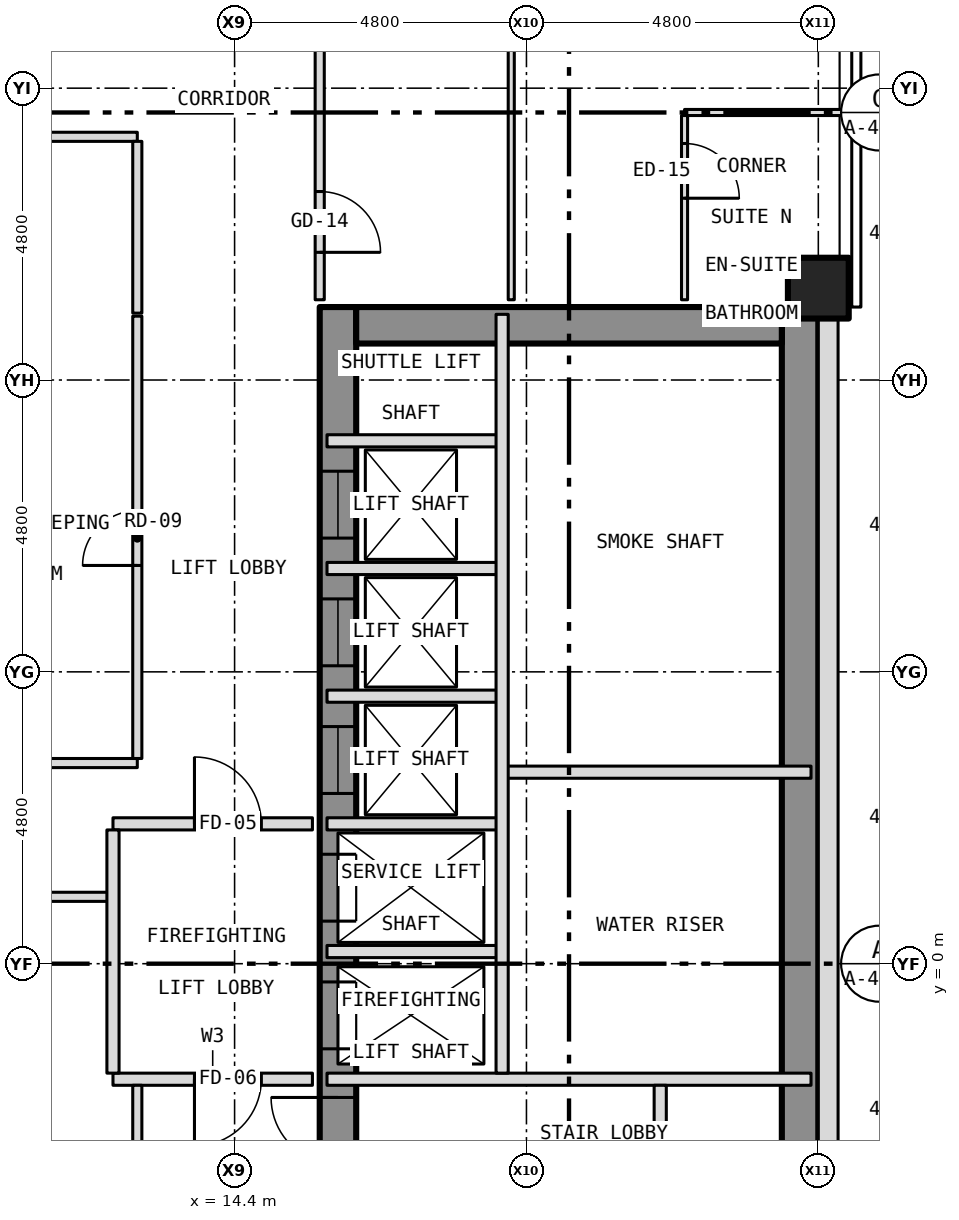
"""IFC4 building model, lengths in metres.
Left out: names, types, materials, properties, quantities, classifications, styles, units other than length and angle.
Written with IfcOpenShell. Run it as: python <this file> out.ifc"""

import sys

from ifc_helpers import new_model, si_unit, direction, frame, frame_2d, origin, origin_2d, place, context, subcontext, project, spatial, rectangle, hollow_rectangle, extrude, element, fill, save


model = new_model("IFC4")
c1 = context("Model", 3, precision=1e-05, world=origin(), true_north=direction((0.0, 1.0)))
c2 = subcontext(c1, "Body", "Model", "MODEL_VIEW")
j1 = project(units=[si_unit("LENGTHUNIT", "METRE"), si_unit("PLANEANGLEUNIT", "RADIAN")], contexts=[c1])
p1 = place(None, origin())
s1 = spatial("IfcSite", under=j1, at=p1, CompositionType="ELEMENT")
p2 = place(p1, origin())
s2 = spatial("IfcBuilding", under=s1, at=p2, CompositionType="ELEMENT")
p3 = place(p2, frame((0.0, 0.0, 39.0)))
s3 = spatial("IfcBuildingStorey", under=s2, at=p3, CompositionType="ELEMENT", Elevation=39.0)
p4 = place(p3, frame((24.0, 11.111, -0.15), z_axis=(0.0, 0.0, 1.0), x_axis=(1.0, 0.0, 0.0)))
e1 = element("IfcColumn", 1, at=p4, inside=s3, PredefinedType="COLUMN", context=c2, shape_type="SweptSolid", body=[
    extrude(hollow_rectangle(XDim=1.0, YDim=1.0, WallThickness=0.06, at=origin_2d()), origin(), (0.0, 0.0, 1.0), 3.5),
])
p5 = place(p3, frame((16.1, -10.8, 0.0), z_axis=(0.0, 0.0, 1.0), x_axis=(0.0, 1.0, 0.0)))
e2 = element("IfcWall", 2, at=p5, inside=s3, PredefinedType="SHEAR", context=c2, shape_type="SweptSolid", body=[
    extrude(rectangle(XDim=21.6, YDim=0.6, at=frame_2d((10.8, 0.0))), origin(), (0.0, 0.0, 1.0), 3.25),
])
p6 = place(p5, frame((9.4, 0.0, 0.0)))
e3 = element("IfcOpeningElement", 3, at=p6, cuts=e2, PredefinedType="OPENING", context=c2, shape_type="SweptSolid", body=[
    extrude(rectangle(XDim=1.1, YDim=2.1, at=frame_2d((0.55, 1.05))), frame((0.0, 0.312, 0.0), z_axis=(0.0, -1.0, 0.0), x_axis=(1.0, 0.0, 0.0)), (0.0, 0.0, 1.0), 0.624),
])
p7 = place(p5, frame((11.5, 0.0, 0.0)))
e4 = element("IfcOpeningElement", 4, at=p7, cuts=e2, PredefinedType="OPENING", context=c2, shape_type="SweptSolid", body=[
    extrude(rectangle(XDim=1.1, YDim=2.1, at=frame_2d((0.55, 1.05))), frame((0.0, 0.312, 0.0), z_axis=(0.0, -1.0, 0.0), x_axis=(1.0, 0.0, 0.0)), (0.0, 0.0, 1.0), 0.624),
])
p8 = place(p5, frame((13.6, 0.0, 0.0)))
e5 = element("IfcOpeningElement", 5, at=p8, cuts=e2, PredefinedType="OPENING", context=c2, shape_type="SweptSolid", body=[
    extrude(rectangle(XDim=1.1, YDim=2.1, at=frame_2d((0.55, 1.05))), frame((0.0, 0.312, 0.0), z_axis=(0.0, -1.0, 0.0), x_axis=(1.0, 0.0, 0.0)), (0.0, 0.0, 1.0), 0.624),
])
p9 = place(p5, frame((15.7, 0.0, 0.0)))
e6 = element("IfcOpeningElement", 6, at=p9, cuts=e2, PredefinedType="OPENING", context=c2, shape_type="SweptSolid", body=[
    extrude(rectangle(XDim=1.1, YDim=2.1, at=frame_2d((0.55, 1.05))), frame((0.0, 0.312, 0.0), z_axis=(0.0, -1.0, 0.0), x_axis=(1.0, 0.0, 0.0)), (0.0, 0.0, 1.0), 0.624),
])
p10 = place(p5, frame((17.8, 0.0, 0.0)))
e7 = element("IfcOpeningElement", 7, at=p10, cuts=e2, PredefinedType="OPENING", context=c2, shape_type="SweptSolid", body=[
    extrude(rectangle(XDim=1.1, YDim=2.1, at=frame_2d((0.55, 1.05))), frame((0.0, 0.312, 0.0), z_axis=(0.0, -1.0, 0.0), x_axis=(1.0, 0.0, 0.0)), (0.0, 0.0, 1.0), 0.624),
])
p11 = place(p5, frame((5.642, 0.0, 0.0)))
e8 = element("IfcOpeningElement", 8, at=p11, cuts=e2, PredefinedType="OPENING", context=c2, shape_type="SweptSolid", body=[
    extrude(rectangle(XDim=1.1, YDim=2.1, at=frame_2d((0.55, 1.05))), frame((0.0, 0.312, 0.0), z_axis=(0.0, -1.0, 0.0), x_axis=(1.0, 0.0, 0.0)), (0.0, 0.0, 1.0), 0.624),
])
p12 = place(p5, frame((7.5, 0.0, 0.0)))
e9 = element("IfcOpeningElement", 9, at=p12, cuts=e2, PredefinedType="OPENING", context=c2, shape_type="SweptSolid", body=[
    extrude(rectangle(XDim=1.1, YDim=2.1, at=frame_2d((0.55, 1.05))), frame((0.0, 0.312, 0.0), z_axis=(0.0, -1.0, 0.0), x_axis=(1.0, 0.0, 0.0)), (0.0, 0.0, 1.0), 0.624),
])
p13 = place(p3, frame((23.7, -10.8, 0.0), z_axis=(0.0, 0.0, 1.0), x_axis=(0.0, 1.0, 0.0)))
e10 = element("IfcWall", 10, at=p13, inside=s3, PredefinedType="SHEAR", context=c2, shape_type="SweptSolid", body=[
    extrude(rectangle(XDim=21.6, YDim=0.6, at=frame_2d((10.8, 0.0))), origin(), (0.0, 0.0, 1.0), 3.25),
])
p14 = place(p3, frame((16.4, 10.5, 0.0), z_axis=(0.0, 0.0, 1.0), x_axis=(1.0, 0.0, 0.0)))
e11 = element("IfcWall", 11, at=p14, inside=s3, PredefinedType="SHEAR", context=c2, shape_type="SweptSolid", body=[
    extrude(rectangle(XDim=7.0, YDim=0.6, at=frame_2d((3.5, 0.0))), origin(), (0.0, 0.0, 1.0), 3.25),
])
p15 = place(p3, frame((24.163, -10.8, 0.0), z_axis=(0.0, 0.0, 1.0), x_axis=(0.0, 1.0, 0.0)))
e12 = element("IfcWall", 12, at=p15, inside=s3, PredefinedType="SOLIDWALL", context=c2, shape_type="SweptSolid", body=[
    extrude(rectangle(XDim=21.6, YDim=0.325, at=frame_2d((10.8, 0.0))), origin(), (0.0, 0.0, 1.0), 3.5),
])
p16 = place(p15, frame((2.95, 0.0, 1.0)))
e13 = element("IfcOpeningElement", 13, at=p16, cuts=e12, PredefinedType="OPENING", context=c2, shape_type="SweptSolid", body=[
    extrude(rectangle(XDim=0.6, YDim=1.5, at=frame_2d((0.3, 0.75))), frame((0.0, 0.175, 0.0), z_axis=(0.0, -1.0, 0.0), x_axis=(1.0, 0.0, 0.0)), (0.0, 0.0, 1.0), 0.349),
])
p17 = place(p3, frame((12.4, -1.9, 0.0), z_axis=(0.0, 0.0, 1.0), x_axis=(1.0, 0.0, 0.0)))
e14 = element("IfcWall", 14, at=p17, inside=s3, PredefinedType="PARTITIONING", context=c2, shape_type="SweptSolid", body=[
    extrude(rectangle(XDim=3.28, YDim=0.2, at=frame_2d((1.64, 0.0))), origin(), (0.0, 0.0, 1.0), 3.35),
])
p18 = place(p17, frame((1.34, 0.0, 0.0)))
e15 = element("IfcOpeningElement", 15, at=p18, cuts=e14, PredefinedType="OPENING", context=c2, shape_type="SweptSolid", body=[
    extrude(rectangle(XDim=1.1, YDim=2.1, at=frame_2d((0.55, 1.05))), frame((0.0, 0.112, 0.0), z_axis=(0.0, -1.0, 0.0), x_axis=(1.0, 0.0, 0.0)), (0.0, 0.0, 1.0), 0.224),
])
p19 = place(p3, frame((15.92, -1.9, 0.0), z_axis=(0.0, 0.0, 1.0), x_axis=(1.0, 0.0, 0.0)))
e16 = element("IfcWall", 16, at=p19, inside=s3, PredefinedType="PARTITIONING", context=c2, shape_type="SweptSolid", body=[
    extrude(rectangle(XDim=7.96, YDim=0.2, at=frame_2d((3.98, 0.0))), origin(), (0.0, 0.0, 1.0), 3.25),
])
p20 = place(p3, frame((15.92, 0.2, 0.0), z_axis=(0.0, 0.0, 1.0), x_axis=(1.0, 0.0, 0.0)))
e17 = element("IfcWall", 17, at=p20, inside=s3, PredefinedType="PARTITIONING", context=c2, shape_type="SweptSolid", body=[
    extrude(rectangle(XDim=2.88, YDim=0.2, at=frame_2d((1.44, 0.0))), origin(), (0.0, 0.0, 1.0), 3.25),
])
p21 = place(p3, frame((-12.4, 1.1, 0.0), z_axis=(0.0, 0.0, 1.0), x_axis=(1.0, 0.0, 0.0)))
e18 = element("IfcWall", 18, at=p21, inside=s3, PredefinedType="PARTITIONING", context=c2, shape_type="SweptSolid", body=[
    extrude(rectangle(XDim=24.8, YDim=0.15, at=frame_2d((12.4, 0.0))), origin(), (0.0, 0.0, 1.0), 3.35),
])
p22 = place(p3, frame((12.4, 2.3, 0.0), z_axis=(0.0, 0.0, 1.0), x_axis=(1.0, 0.0, 0.0)))
e19 = element("IfcWall", 19, at=p22, inside=s3, PredefinedType="PARTITIONING", context=c2, shape_type="SweptSolid", body=[
    extrude(rectangle(XDim=3.28, YDim=0.2, at=frame_2d((1.64, 0.0))), origin(), (0.0, 0.0, 1.0), 3.35),
])
p23 = place(p22, frame((1.34, 0.0, 0.0)))
e20 = element("IfcOpeningElement", 20, at=p23, cuts=e19, PredefinedType="OPENING", context=c2, shape_type="SweptSolid", body=[
    extrude(rectangle(XDim=1.1, YDim=2.1, at=frame_2d((0.55, 1.05))), frame((0.0, 0.112, 0.0), z_axis=(0.0, -1.0, 0.0), x_axis=(1.0, 0.0, 0.0)), (0.0, 0.0, 1.0), 0.224),
])
p24 = place(p3, frame((15.92, 2.3, 0.0), z_axis=(0.0, 0.0, 1.0), x_axis=(1.0, 0.0, 0.0)))
e21 = element("IfcWall", 21, at=p24, inside=s3, PredefinedType="PARTITIONING", context=c2, shape_type="SweptSolid", body=[
    extrude(rectangle(XDim=2.88, YDim=0.2, at=frame_2d((1.44, 0.0))), origin(), (0.0, 0.0, 1.0), 3.25),
])
p25 = place(p3, frame((18.8, 3.15, 0.0), z_axis=(0.0, 0.0, 1.0), x_axis=(1.0, 0.0, 0.0)))
e22 = element("IfcWall", 22, at=p25, inside=s3, PredefinedType="PARTITIONING", context=c2, shape_type="SweptSolid", body=[
    extrude(rectangle(XDim=5.08, YDim=0.2, at=frame_2d((2.54, 0.0))), origin(), (0.0, 0.0, 1.0), 3.25),
])
p26 = place(p3, frame((-12.8, 3.3, 0.0), z_axis=(0.0, 0.0, 1.0), x_axis=(1.0, 0.0, 0.0)))
e23 = element("IfcWall", 23, at=p26, inside=s3, PredefinedType="PARTITIONING", context=c2, shape_type="SweptSolid", body=[
    extrude(rectangle(XDim=25.6, YDim=0.15, at=frame_2d((12.8, 0.0))), origin(), (0.0, 0.0, 1.0), 3.35),
])
p27 = place(p26, frame((1.95, 0.0, 0.0)))
e24 = element("IfcOpeningElement", 24, at=p27, cuts=e23, PredefinedType="OPENING", context=c2, shape_type="SweptSolid", body=[
    extrude(rectangle(XDim=0.9, YDim=2.1, at=frame_2d((0.45, 1.05))), frame((0.0, 0.087, 0.0), z_axis=(0.0, -1.0, 0.0), x_axis=(1.0, 0.0, 0.0)), (0.0, 0.0, 1.0), 0.174),
])
for number, where, z_axis, x_axis in (
    (25, (15.92, 4.4, 0.0), (0.0, 0.0, 1.0), (1.0, 0.0, 0.0)),
    (26, (15.92, 6.5, 0.0), (0.0, 0.0, 1.0), (1.0, 0.0, 0.0)),
    (27, (15.92, 8.6, 0.0), (0.0, 0.0, 1.0), (1.0, 0.0, 0.0)),
):
    element("IfcWall", number, at=place(p3, frame(where, z_axis=z_axis, x_axis=x_axis)), inside=s3, PredefinedType="PARTITIONING", context=c2, shape_type="SweptSolid", body=[
        extrude(rectangle(XDim=2.88, YDim=0.2, at=frame_2d((1.44, 0.0))), origin(), (0.0, 0.0, 1.0), 3.25),
    ])
p28 = place(p3, frame((-12.8, 13.6, 0.0), z_axis=(0.0, 0.0, 1.0), x_axis=(1.0, 0.0, 0.0)))
e28 = element("IfcWall", 28, at=p28, inside=s3, PredefinedType="PARTITIONING", context=c2, shape_type="SweptSolid", body=[
    extrude(rectangle(XDim=25.6, YDim=0.15, at=frame_2d((12.8, 0.0))), origin(), (0.0, 0.0, 1.0), 3.35),
])
p29 = place(p28, frame((12.35, 0.0, 0.0)))
e29 = element("IfcOpeningElement", 29, at=p29, cuts=e28, PredefinedType="OPENING", context=c2, shape_type="SweptSolid", body=[
    extrude(rectangle(XDim=0.9, YDim=2.1, at=frame_2d((0.45, 1.05))), frame((0.0, 0.087, 0.0), z_axis=(0.0, -1.0, 0.0), x_axis=(1.0, 0.0, 0.0)), (0.0, 0.0, 1.0), 0.174),
])
p30 = place(p3, frame((21.8, 14.0, 0.0), z_axis=(0.0, 0.0, 1.0), x_axis=(1.0, 0.0, 0.0)))
e30 = element("IfcWall", 30, at=p30, inside=s3, PredefinedType="PARTITIONING", context=c2, shape_type="SweptSolid", body=[
    extrude(rectangle(XDim=2.78, YDim=0.1, at=frame_2d((1.39, 0.0))), origin(), (0.0, 0.0, 1.0), 3.35),
])
p31 = place(p3, frame((12.4, -1.8, 0.0), z_axis=(0.0, 0.0, 1.0), x_axis=(0.0, 1.0, 0.0)))
e31 = element("IfcWall", 31, at=p31, inside=s3, PredefinedType="PARTITIONING", context=c2, shape_type="SweptSolid", body=[
    extrude(rectangle(XDim=4.0, YDim=0.2, at=frame_2d((2.0, 0.0))), origin(), (0.0, 0.0, 1.0), 3.35),
])
p32 = place(p3, frame((12.8, -13.525, 0.0), z_axis=(0.0, 0.0, 1.0), x_axis=(0.0, 1.0, 0.0)))
e32 = element("IfcWall", 32, at=p32, inside=s3, PredefinedType="PARTITIONING", context=c2, shape_type="SweptSolid", body=[
    extrude(rectangle(XDim=11.525, YDim=0.15, at=frame_2d((5.762, 0.0))), origin(), (0.0, 0.0, 1.0), 3.35),
])
p33 = place(p32, frame((6.725, 0.0, 0.0)))
e33 = element("IfcOpeningElement", 33, at=p33, cuts=e32, PredefinedType="OPENING", context=c2, shape_type="SweptSolid", body=[
    extrude(rectangle(XDim=0.9, YDim=2.1, at=frame_2d((0.45, 1.05))), frame((0.0, 0.087, 0.0), z_axis=(0.0, -1.0, 0.0), x_axis=(1.0, 0.0, 0.0)), (0.0, 0.0, 1.0), 0.174),
])
p34 = place(p3, frame((12.8, 3.375, 0.0), z_axis=(0.0, 0.0, 1.0), x_axis=(0.0, 1.0, 0.0)))
e34 = element("IfcWall", 34, at=p34, inside=s3, PredefinedType="PARTITIONING", context=c2, shape_type="SweptSolid", body=[
    extrude(rectangle(XDim=7.275, YDim=0.15, at=frame_2d((3.637, 0.0))), origin(), (0.0, 0.0, 1.0), 3.35),
])
p35 = place(p34, frame((3.175, 0.0, 0.0)))
e35 = element("IfcOpeningElement", 35, at=p35, cuts=e34, PredefinedType="OPENING", context=c2, shape_type="SweptSolid", body=[
    extrude(rectangle(XDim=0.9, YDim=2.1, at=frame_2d((0.45, 1.05))), frame((0.0, 0.087, 0.0), z_axis=(0.0, -1.0, 0.0), x_axis=(1.0, 0.0, 0.0)), (0.0, 0.0, 1.0), 0.174),
])
p36 = place(p3, frame((12.8, 10.7, 0.0), z_axis=(0.0, 0.0, 1.0), x_axis=(0.0, 1.0, 0.0)))
e36 = element("IfcWall", 36, at=p36, inside=s3, PredefinedType="PARTITIONING", context=c2, shape_type="SweptSolid", body=[
    extrude(rectangle(XDim=2.825, YDim=0.15, at=frame_2d((1.413, 0.0))), origin(), (0.0, 0.0, 1.0), 3.35),
])
p37 = place(p3, frame((15.8, 10.92, 0.0), z_axis=(0.0, 0.0, 1.0), x_axis=(0.0, 1.0, 0.0)))
e37 = element("IfcWall", 37, at=p37, inside=s3, PredefinedType="PARTITIONING", context=c2, shape_type="SweptSolid", body=[
    extrude(rectangle(XDim=4.805, YDim=0.15, at=frame_2d((2.403, 0.0))), origin(), (0.0, 0.0, 1.0), 3.35),
])
p38 = place(p37, frame((0.78, 0.0, 0.0)))
e38 = element("IfcOpeningElement", 38, at=p38, cuts=e37, PredefinedType="OPENING", context=c2, shape_type="SweptSolid", body=[
    extrude(rectangle(XDim=1.0, YDim=2.1, at=frame_2d((0.5, 1.05))), frame((0.0, 0.087, 0.0), z_axis=(0.0, -1.0, 0.0), x_axis=(1.0, 0.0, 0.0)), (0.0, 0.0, 1.0), 0.174),
])
p39 = place(p3, frame((18.8, -1.8, 0.0), z_axis=(0.0, 0.0, 1.0), x_axis=(0.0, 1.0, 0.0)))
e39 = element("IfcWall", 39, at=p39, inside=s3, PredefinedType="PARTITIONING", context=c2, shape_type="SweptSolid", body=[
    extrude(rectangle(XDim=12.48, YDim=0.2, at=frame_2d((6.24, 0.0))), origin(), (0.0, 0.0, 1.0), 3.25),
])
p40 = place(p3, frame((18.95, 10.92, 0.0), z_axis=(0.0, 0.0, 1.0), x_axis=(0.0, 1.0, 0.0)))
e40 = element("IfcWall", 40, at=p40, inside=s3, PredefinedType="PARTITIONING", context=c2, shape_type="SweptSolid", body=[
    extrude(rectangle(XDim=13.66, YDim=0.1, at=frame_2d((6.83, 0.0))), origin(), (0.0, 0.0, 1.0), 3.35),
])
p41 = place(p40, frame((6.03, 0.0, 0.0)))
e41 = element("IfcOpeningElement", 41, at=p41, cuts=e40, PredefinedType="OPENING", context=c2, shape_type="SweptSolid", body=[
    extrude(rectangle(XDim=0.9, YDim=2.1, at=frame_2d((0.45, 1.05))), frame((0.0, 0.062, 0.0), z_axis=(0.0, -1.0, 0.0), x_axis=(1.0, 0.0, 0.0)), (0.0, 0.0, 1.0), 0.124),
])
p42 = place(p3, frame((21.4, -10.68, 0.0), z_axis=(0.0, 0.0, 1.0), x_axis=(0.0, 1.0, 0.0)))
e42 = element("IfcWall", 42, at=p42, inside=s3, PredefinedType="PARTITIONING", context=c2, shape_type="SweptSolid", body=[
    extrude(rectangle(XDim=8.68, YDim=0.2, at=frame_2d((4.34, 0.0))), origin(), (0.0, 0.0, 1.0), 3.25),
])
p43 = place(p42, frame((0.899, 0.0, 0.0)))
e43 = element("IfcOpeningElement", 43, at=p43, cuts=e42, PredefinedType="OPENING", context=c2, shape_type="SweptSolid", body=[
    extrude(rectangle(XDim=0.9, YDim=2.1, at=frame_2d((0.45, 1.05))), frame((0.0, 0.112, 0.0), z_axis=(0.0, -1.0, 0.0), x_axis=(1.0, 0.0, 0.0)), (0.0, 0.0, 1.0), 0.224),
])
p44 = place(p42, frame((5.349, 0.0, 0.0)))
e44 = element("IfcOpeningElement", 44, at=p44, cuts=e42, PredefinedType="OPENING", context=c2, shape_type="SweptSolid", body=[
    extrude(rectangle(XDim=0.9, YDim=2.1, at=frame_2d((0.45, 1.05))), frame((0.0, 0.112, 0.0), z_axis=(0.0, -1.0, 0.0), x_axis=(1.0, 0.0, 0.0)), (0.0, 0.0, 1.0), 0.224),
])
p45 = place(p3, frame((21.8, 10.92, 0.0), z_axis=(0.0, 0.0, 1.0), x_axis=(0.0, 1.0, 0.0)))
e45 = element("IfcWall", 45, at=p45, inside=s3, PredefinedType="PARTITIONING", context=c2, shape_type="SweptSolid", body=[
    extrude(rectangle(XDim=3.03, YDim=0.1, at=frame_2d((1.515, 0.0))), origin(), (0.0, 0.0, 1.0), 3.35),
])
p46 = place(p45, frame((1.67, 0.0, 0.0)))
e46 = element("IfcOpeningElement", 46, at=p46, cuts=e45, PredefinedType="OPENING", context=c2, shape_type="SweptSolid", body=[
    extrude(rectangle(XDim=0.9, YDim=2.1, at=frame_2d((0.45, 1.05))), frame((0.0, 0.062, 0.0), z_axis=(0.0, -1.0, 0.0), x_axis=(1.0, 0.0, 0.0)), (0.0, 0.0, 1.0), 0.124),
])
p47 = place(p6, origin())
e47 = element("IfcDoor", 47, at=p47, inside=s3, OperationType="SLIDING_TO_LEFT", PredefinedType="DOOR", context=c2, shape_type="SweptSolid", body=[
    extrude(rectangle(XDim=1.1, YDim=2.1, at=frame_2d((0.55, 1.05))), frame((0.0, 0.025, 0.0), z_axis=(0.0, -1.0, 0.0), x_axis=(1.0, 0.0, 0.0)), (0.0, 0.0, 1.0), 0.05),
])
fill(e3, e47)
p48 = place(p7, origin())
e48 = element("IfcDoor", 48, at=p48, inside=s3, OperationType="SLIDING_TO_LEFT", PredefinedType="DOOR", context=c2, shape_type="SweptSolid", body=[
    extrude(rectangle(XDim=1.1, YDim=2.1, at=frame_2d((0.55, 1.05))), frame((0.0, 0.025, 0.0), z_axis=(0.0, -1.0, 0.0), x_axis=(1.0, 0.0, 0.0)), (0.0, 0.0, 1.0), 0.05),
])
fill(e4, e48)
p49 = place(p8, origin())
e49 = element("IfcDoor", 49, at=p49, inside=s3, OperationType="SLIDING_TO_LEFT", PredefinedType="DOOR", context=c2, shape_type="SweptSolid", body=[
    extrude(rectangle(XDim=1.1, YDim=2.1, at=frame_2d((0.55, 1.05))), frame((0.0, 0.025, 0.0), z_axis=(0.0, -1.0, 0.0), x_axis=(1.0, 0.0, 0.0)), (0.0, 0.0, 1.0), 0.05),
])
fill(e5, e49)
p50 = place(p9, origin())
e50 = element("IfcDoor", 50, at=p50, inside=s3, OperationType="SLIDING_TO_LEFT", PredefinedType="DOOR", context=c2, shape_type="SweptSolid", body=[
    extrude(rectangle(XDim=1.1, YDim=2.1, at=frame_2d((0.55, 1.05))), frame((0.0, 0.025, 0.0), z_axis=(0.0, -1.0, 0.0), x_axis=(1.0, 0.0, 0.0)), (0.0, 0.0, 1.0), 0.05),
])
fill(e6, e50)
p51 = place(p10, origin())
e51 = element("IfcDoor", 51, at=p51, inside=s3, OperationType="SLIDING_TO_LEFT", PredefinedType="DOOR", context=c2, shape_type="SweptSolid", body=[
    extrude(rectangle(XDim=1.1, YDim=2.1, at=frame_2d((0.55, 1.05))), frame((0.0, 0.025, 0.0), z_axis=(0.0, -1.0, 0.0), x_axis=(1.0, 0.0, 0.0)), (0.0, 0.0, 1.0), 0.05),
])
fill(e7, e51)
p52 = place(p12, origin())
e52 = element("IfcDoor", 52, at=p52, inside=s3, OperationType="SINGLE_SWING_RIGHT", PredefinedType="DOOR", context=c2, shape_type="SweptSolid", body=[
    extrude(rectangle(XDim=1.1, YDim=2.1, at=frame_2d((0.55, 1.05))), frame((0.0, 0.025, 0.0), z_axis=(0.0, -1.0, 0.0), x_axis=(1.0, 0.0, 0.0)), (0.0, 0.0, 1.0), 0.05),
])
fill(e9, e52)
p53 = place(p23, origin())
e53 = element("IfcDoor", 53, at=p53, inside=s3, OperationType="SINGLE_SWING_LEFT", PredefinedType="DOOR", context=c2, shape_type="SweptSolid", body=[
    extrude(rectangle(XDim=1.1, YDim=2.1, at=frame_2d((0.55, 1.05))), frame((0.0, 0.025, 0.0), z_axis=(0.0, -1.0, 0.0), x_axis=(1.0, 0.0, 0.0)), (0.0, 0.0, 1.0), 0.05),
])
fill(e20, e53)
p54 = place(p18, origin())
e54 = element("IfcDoor", 54, at=p54, inside=s3, OperationType="SINGLE_SWING_LEFT", PredefinedType="DOOR", context=c2, shape_type="SweptSolid", body=[
    extrude(rectangle(XDim=1.1, YDim=2.1, at=frame_2d((0.55, 1.05))), frame((0.0, 0.025, 0.0), z_axis=(0.0, -1.0, 0.0), x_axis=(1.0, 0.0, 0.0)), (0.0, 0.0, 1.0), 0.05),
])
fill(e15, e54)
p55 = place(p38, origin())
e55 = element("IfcDoor", 55, at=p55, inside=s3, OperationType="SINGLE_SWING_LEFT", PredefinedType="DOOR", context=c2, shape_type="SweptSolid", body=[
    extrude(rectangle(XDim=1.0, YDim=2.1, at=frame_2d((0.5, 1.05))), frame((0.0, 0.025, 0.0), z_axis=(0.0, -1.0, 0.0), x_axis=(1.0, 0.0, 0.0)), (0.0, 0.0, 1.0), 0.05),
])
fill(e38, e55)
p56 = place(p46, origin())
e56 = element("IfcDoor", 56, at=p56, inside=s3, OperationType="SINGLE_SWING_LEFT", PredefinedType="DOOR", context=c2, shape_type="SweptSolid", body=[
    extrude(rectangle(XDim=0.9, YDim=2.1, at=frame_2d((0.45, 1.05))), frame((0.0, 0.025, 0.0), z_axis=(0.0, -1.0, 0.0), x_axis=(1.0, 0.0, 0.0)), (0.0, 0.0, 1.0), 0.05),
])
fill(e46, e56)
p57 = place(p35, origin())
e57 = element("IfcDoor", 57, at=p57, inside=s3, OperationType="SINGLE_SWING_LEFT", PredefinedType="DOOR", context=c2, shape_type="SweptSolid", body=[
    extrude(rectangle(XDim=0.9, YDim=2.1, at=frame_2d((0.45, 1.05))), frame((0.0, 0.025, 0.0), z_axis=(0.0, -1.0, 0.0), x_axis=(1.0, 0.0, 0.0)), (0.0, 0.0, 1.0), 0.05),
])
fill(e35, e57)
save(model, sys.argv[1])
